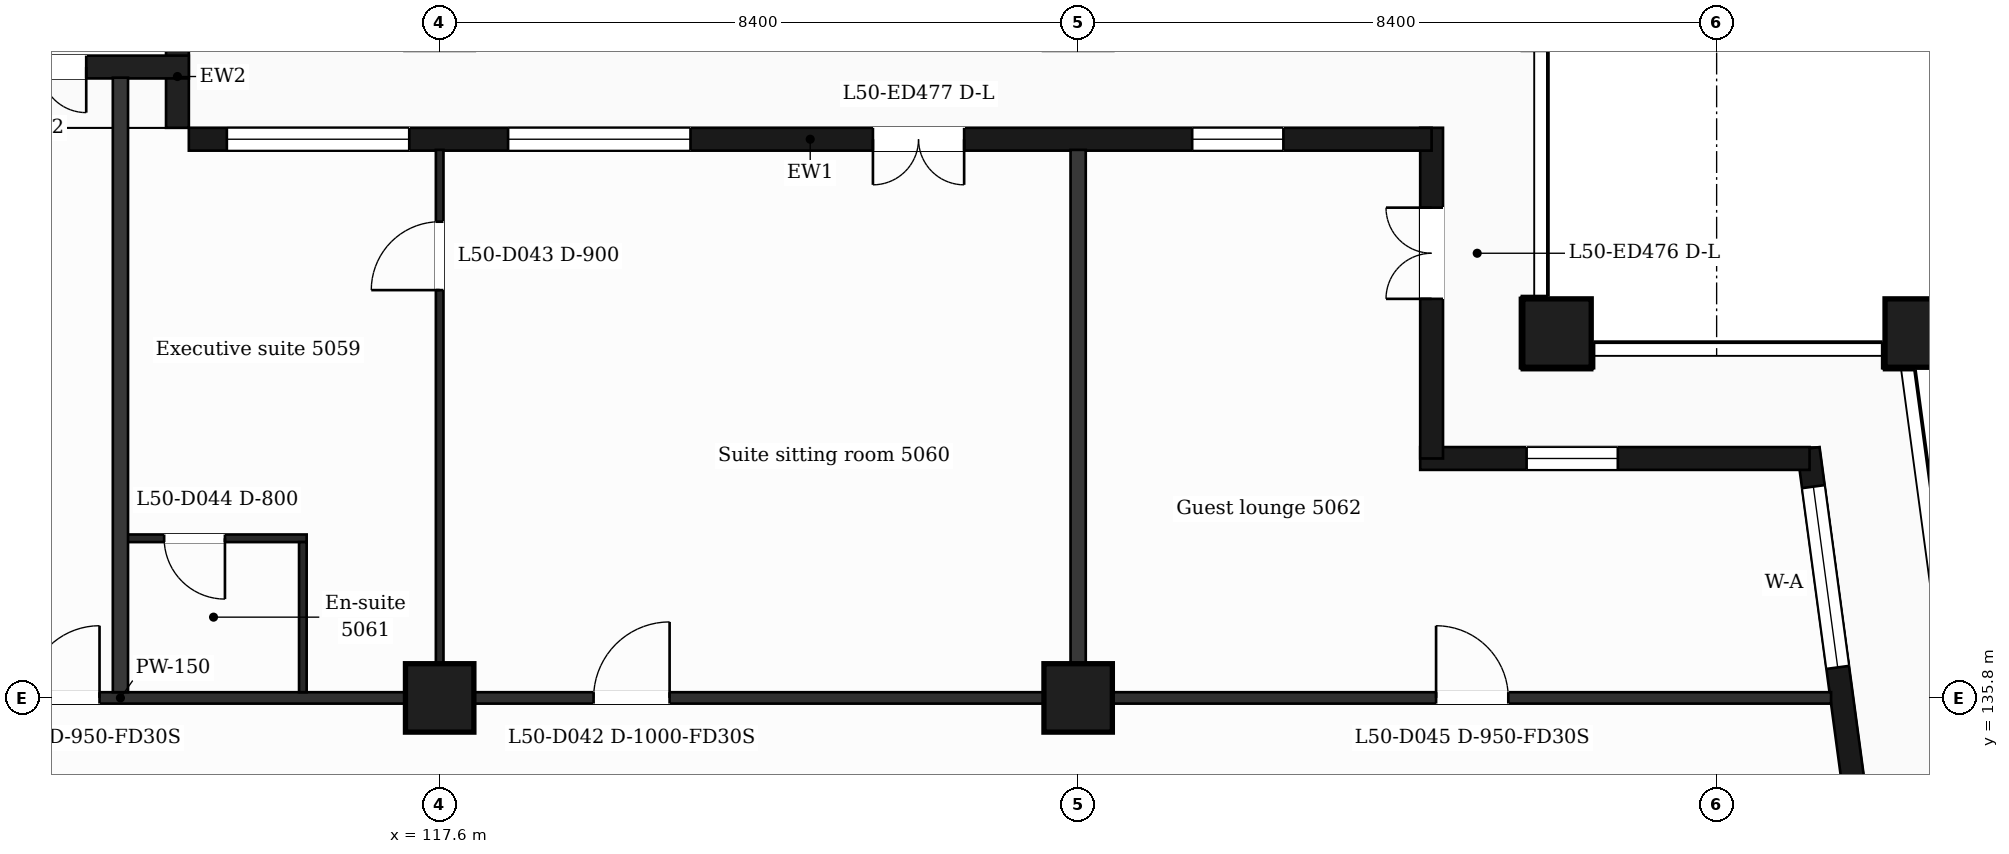
"""IFC4 building model, lengths in metres.
Left out: names, types, materials, properties, quantities, classifications, styles, units other than length and angle.
Written with IfcOpenShell. Run it as: python <this file> out.ifc"""

import sys

from ifc_helpers import new_model, si_unit, direction, frame, frame_2d, origin, origin_2d, place, context, subcontext, project, spatial, rectangle, extrude, element, fill, save


model = new_model("IFC4")
c1 = context("Model", 3, precision=1e-05, world=origin(), true_north=direction((0.0, 1.0)))
c2 = subcontext(c1, "Body", "Model", "MODEL_VIEW")
j1 = project(units=[si_unit("LENGTHUNIT", "METRE"), si_unit("PLANEANGLEUNIT", "RADIAN")], contexts=[c1])
p1 = place(None, origin())
s1 = spatial("IfcSite", under=j1, at=p1, CompositionType="ELEMENT")
p2 = place(p1, origin())
s2 = spatial("IfcBuilding", under=s1, at=p2, CompositionType="ELEMENT")
p3 = place(p2, frame((0.0, 0.0, 209.6)))
s3 = spatial("IfcBuildingStorey", under=s2, at=p3, CompositionType="ELEMENT", Elevation=209.6)
for number, where, z_axis, x_axis in (
    (1, (132.3, 140.6, 0.0), (0.0, 0.0, 1.0), (1.0, 0.0, 0.0)),
    (2, (137.065, 140.6, 0.0), (0.0, 0.0, 1.0), (1.0, 0.0, 0.0)),
    (3, (117.6, 135.8, 0.0), (0.0, 0.0, 1.0), (1.0, 0.0, 0.0)),
    (4, (126.0, 135.8, 0.0), (0.0, 0.0, 1.0), (1.0, 0.0, 0.0)),
):
    element("IfcColumn", number, at=place(p3, frame(where, z_axis=z_axis, x_axis=x_axis)), inside=s3, PredefinedType="COLUMN", context=c2, shape_type="SweptSolid", body=[
        extrude(rectangle(XDim=0.9, YDim=0.9, at=origin_2d()), origin(), (0.0, 0.0, 1.0), 3.7),
    ])
p4 = place(p3, frame((136.504, 132.4, 0.0), z_axis=(0.0, 0.0, 1.0), x_axis=(-0.133399697462, 0.99106231929, 0.0)))
e5 = element("IfcWall", 5, at=p4, inside=s3, PredefinedType="SOLIDWALL", context=c2, shape_type="SweptSolid", body=[
    extrude(rectangle(XDim=6.74, YDim=0.3, at=frame_2d((3.37, 0.0))), origin(), (0.0, 0.0, 1.0), 3.38),
])
p5 = place(p4, frame((1.115, 0.0, 0.0)))
e6 = element("IfcOpeningElement", 6, at=p5, cuts=e5, PredefinedType="OPENING", context=c2, shape_type="SweptSolid", body=[
    extrude(rectangle(XDim=1.2, YDim=2.4, at=frame_2d((0.6, 1.2))), frame((0.0, 0.16, 0.0), z_axis=(0.0, -1.0, 0.0), x_axis=(1.0, 0.0, 0.0)), (0.0, 0.0, 1.0), 0.32),
])
p6 = place(p4, frame((3.835, 0.0, 0.9)))
e7 = element("IfcOpeningElement", 7, at=p6, cuts=e5, PredefinedType="OPENING", context=c2, shape_type="SweptSolid", body=[
    extrude(rectangle(XDim=2.4, YDim=2.1, at=frame_2d((1.2, 1.05))), frame((0.0, 0.16, 0.0), z_axis=(0.0, -1.0, 0.0), x_axis=(1.0, 0.0, 0.0)), (0.0, 0.0, 1.0), 0.32),
])
p7 = place(p3, frame((135.623, 138.95, 0.0), z_axis=(0.0, 0.0, 1.0), x_axis=(-1.0, 0.0, 0.0)))
e8 = element("IfcWall", 8, at=p7, inside=s3, PredefinedType="SOLIDWALL", context=c2, shape_type="SweptSolid", body=[
    extrude(rectangle(XDim=5.123, YDim=0.3, at=frame_2d((2.561, 0.0))), origin(), (0.0, 0.0, 1.0), 3.38),
])
p8 = place(p7, frame((2.523, 0.0, 0.9)))
e9 = element("IfcOpeningElement", 9, at=p8, cuts=e8, PredefinedType="OPENING", context=c2, shape_type="SweptSolid", body=[
    extrude(rectangle(XDim=1.2, YDim=2.1, at=frame_2d((0.6, 1.05))), frame((0.0, 0.16, 0.0), z_axis=(0.0, -1.0, 0.0), x_axis=(1.0, 0.0, 0.0)), (0.0, 0.0, 1.0), 0.32),
])
p9 = place(p3, frame((130.65, 138.95, 0.0), z_axis=(0.0, 0.0, 1.0), x_axis=(0.0, 1.0, 0.0)))
e10 = element("IfcWall", 10, at=p9, inside=s3, PredefinedType="SOLIDWALL", context=c2, shape_type="SweptSolid", body=[
    extrude(rectangle(XDim=4.35, YDim=0.3, at=frame_2d((2.175, 0.0))), origin(), (0.0, 0.0, 1.0), 3.38),
])
p10 = place(p9, frame((2.1, 0.0, 0.0)))
e11 = element("IfcOpeningElement", 11, at=p10, cuts=e10, PredefinedType="OPENING", context=c2, shape_type="SweptSolid", body=[
    extrude(rectangle(XDim=1.2, YDim=2.4, at=frame_2d((0.6, 1.2))), frame((0.0, 0.16, 0.0), z_axis=(0.0, -1.0, 0.0), x_axis=(1.0, 0.0, 0.0)), (0.0, 0.0, 1.0), 0.32),
])
p11 = place(p3, frame((130.65, 143.15, 0.0), z_axis=(0.0, 0.0, 1.0), x_axis=(-1.0, 0.0, 0.0)))
e12 = element("IfcWall", 12, at=p11, inside=s3, PredefinedType="SOLIDWALL", context=c2, shape_type="SweptSolid", body=[
    extrude(rectangle(XDim=16.35, YDim=0.3, at=frame_2d((8.175, 0.0))), origin(), (0.0, 0.0, 1.0), 3.38),
])
p12 = place(p11, frame((1.95, 0.0, 0.9)))
e13 = element("IfcOpeningElement", 13, at=p12, cuts=e12, PredefinedType="OPENING", context=c2, shape_type="SweptSolid", body=[
    extrude(rectangle(XDim=1.2, YDim=2.1, at=frame_2d((0.6, 1.05))), frame((0.0, 0.16, 0.0), z_axis=(0.0, -1.0, 0.0), x_axis=(1.0, 0.0, 0.0)), (0.0, 0.0, 1.0), 0.32),
])
p13 = place(p11, frame((6.15, 0.0, 0.0)))
e14 = element("IfcOpeningElement", 14, at=p13, cuts=e12, PredefinedType="OPENING", context=c2, shape_type="SweptSolid", body=[
    extrude(rectangle(XDim=1.2, YDim=2.4, at=frame_2d((0.6, 1.2))), frame((0.0, 0.16, 0.0), z_axis=(0.0, -1.0, 0.0), x_axis=(1.0, 0.0, 0.0)), (0.0, 0.0, 1.0), 0.32),
])
p14 = place(p11, frame((9.75, 0.0, 0.9)))
e15 = element("IfcOpeningElement", 15, at=p14, cuts=e12, PredefinedType="OPENING", context=c2, shape_type="SweptSolid", body=[
    extrude(rectangle(XDim=2.4, YDim=2.1, at=frame_2d((1.2, 1.05))), frame((0.0, 0.16, 0.0), z_axis=(0.0, -1.0, 0.0), x_axis=(1.0, 0.0, 0.0)), (0.0, 0.0, 1.0), 0.32),
])
p15 = place(p11, frame((13.45, 0.0, 0.9)))
e16 = element("IfcOpeningElement", 16, at=p15, cuts=e12, PredefinedType="OPENING", context=c2, shape_type="SweptSolid", body=[
    extrude(rectangle(XDim=2.4, YDim=2.1, at=frame_2d((1.2, 1.05))), frame((0.0, 0.16, 0.0), z_axis=(0.0, -1.0, 0.0), x_axis=(1.0, 0.0, 0.0)), (0.0, 0.0, 1.0), 0.32),
])
p16 = place(p3, frame((114.15, 143.3, 0.0), z_axis=(0.0, 0.0, 1.0), x_axis=(0.0, 1.0, 0.0)))
e17 = element("IfcWall", 17, at=p16, inside=s3, PredefinedType="SOLIDWALL", context=c2, shape_type="SweptSolid", body=[
    extrude(rectangle(XDim=1.35, YDim=0.3, at=frame_2d((0.675, 0.0))), origin(), (0.0, 0.0, 1.0), 3.38),
])
p17 = place(p3, frame((114.3, 144.1, 0.0), z_axis=(0.0, 0.0, 1.0), x_axis=(-1.0, 0.0, 0.0)))
e18 = element("IfcWall", 18, at=p17, inside=s3, PredefinedType="SOLIDWALL", context=c2, shape_type="SweptSolid", body=[
    extrude(rectangle(XDim=3.9, YDim=0.3, at=frame_2d((1.95, 0.0))), origin(), (0.0, 0.0, 1.0), 3.38),
])
p18 = place(p17, frame((1.35, 0.0, 0.0)))
e19 = element("IfcOpeningElement", 19, at=p18, cuts=e18, PredefinedType="OPENING", context=c2, shape_type="SweptSolid", body=[
    extrude(rectangle(XDim=1.2, YDim=2.4, at=frame_2d((0.6, 1.2))), frame((0.0, 0.16, 0.0), z_axis=(0.0, -1.0, 0.0), x_axis=(1.0, 0.0, 0.0)), (0.0, 0.0, 1.0), 0.32),
])
p19 = place(p3, frame((90.895, 135.8, 0.0), z_axis=(0.0, 0.0, 1.0), x_axis=(1.0, 0.0, 0.0)))
e20 = element("IfcWall", 20, at=p19, inside=s3, PredefinedType="PARTITIONING", context=c2, shape_type="SweptSolid", body=[
    extrude(rectangle(XDim=45.011, YDim=0.15, at=frame_2d((22.505, 0.0))), origin(), (0.0, 0.0, 1.0), 3.38),
])
p20 = place(p19, frame((6.906, 0.0, 0.0)))
e21 = element("IfcOpeningElement", 21, at=p20, cuts=e20, PredefinedType="OPENING", context=c2, shape_type="SweptSolid", body=[
    extrude(rectangle(XDim=1.0, YDim=2.1, at=frame_2d((0.5, 1.05))), frame((0.0, 0.085, 0.0), z_axis=(0.0, -1.0, 0.0), x_axis=(1.0, 0.0, 0.0)), (0.0, 0.0, 1.0), 0.17),
])
p21 = place(p19, frame((11.531, 0.0, 0.0)))
e22 = element("IfcOpeningElement", 22, at=p21, cuts=e20, PredefinedType="OPENING", context=c2, shape_type="SweptSolid", body=[
    extrude(rectangle(XDim=0.95, YDim=2.1, at=frame_2d((0.475, 1.05))), frame((0.0, 0.085, 0.0), z_axis=(0.0, -1.0, 0.0), x_axis=(1.0, 0.0, 0.0)), (0.0, 0.0, 1.0), 0.17),
])
p22 = place(p19, frame((16.667, 0.0, 0.0)))
e23 = element("IfcOpeningElement", 23, at=p22, cuts=e20, PredefinedType="OPENING", context=c2, shape_type="SweptSolid", body=[
    extrude(rectangle(XDim=0.95, YDim=2.1, at=frame_2d((0.475, 1.05))), frame((0.0, 0.085, 0.0), z_axis=(0.0, -1.0, 0.0), x_axis=(1.0, 0.0, 0.0)), (0.0, 0.0, 1.0), 0.17),
])
p23 = place(p19, frame((21.281, 0.0, 0.0)))
e24 = element("IfcOpeningElement", 24, at=p23, cuts=e20, PredefinedType="OPENING", context=c2, shape_type="SweptSolid", body=[
    extrude(rectangle(XDim=0.95, YDim=2.1, at=frame_2d((0.475, 1.05))), frame((0.0, 0.085, 0.0), z_axis=(0.0, -1.0, 0.0), x_axis=(1.0, 0.0, 0.0)), (0.0, 0.0, 1.0), 0.17),
])
p24 = place(p19, frame((28.73, 0.0, 0.0)))
e25 = element("IfcOpeningElement", 25, at=p24, cuts=e20, PredefinedType="OPENING", context=c2, shape_type="SweptSolid", body=[
    extrude(rectangle(XDim=1.0, YDim=2.1, at=frame_2d((0.5, 1.05))), frame((0.0, 0.085, 0.0), z_axis=(0.0, -1.0, 0.0), x_axis=(1.0, 0.0, 0.0)), (0.0, 0.0, 1.0), 0.17),
])
p25 = place(p19, frame((39.814, 0.0, 0.0)))
e26 = element("IfcOpeningElement", 26, at=p25, cuts=e20, PredefinedType="OPENING", context=c2, shape_type="SweptSolid", body=[
    extrude(rectangle(XDim=0.95, YDim=2.1, at=frame_2d((0.475, 1.05))), frame((0.0, 0.085, 0.0), z_axis=(0.0, -1.0, 0.0), x_axis=(1.0, 0.0, 0.0)), (0.0, 0.0, 1.0), 0.17),
])
p26 = place(p3, frame((113.4, 137.9, 0.0), z_axis=(0.0, 0.0, 1.0), x_axis=(1.0, 0.0, 0.0)))
e27 = element("IfcWall", 27, at=p26, inside=s3, PredefinedType="PARTITIONING", context=c2, shape_type="SweptSolid", body=[
    extrude(rectangle(XDim=2.45, YDim=0.1, at=frame_2d((1.225, 0.0))), origin(), (0.0, 0.0, 1.0), 3.38),
])
p27 = place(p26, frame((0.575, 0.0, 0.0)))
e28 = element("IfcOpeningElement", 28, at=p27, cuts=e27, PredefinedType="OPENING", context=c2, shape_type="SweptSolid", body=[
    extrude(rectangle(XDim=0.8, YDim=2.1, at=frame_2d((0.4, 1.05))), frame((0.0, 0.06, 0.0), z_axis=(0.0, -1.0, 0.0), x_axis=(1.0, 0.0, 0.0)), (0.0, 0.0, 1.0), 0.12),
])
p28 = place(p3, frame((113.4, 135.875, 0.0), z_axis=(0.0, 0.0, 1.0), x_axis=(0.0, 1.0, 0.0)))
e29 = element("IfcWall", 29, at=p28, inside=s3, PredefinedType="PARTITIONING", context=c2, shape_type="SweptSolid", body=[
    extrude(rectangle(XDim=8.085, YDim=0.2, at=frame_2d((4.042, 0.0))), origin(), (0.0, 0.0, 1.0), 3.38),
])
p29 = place(p3, frame((115.8, 135.875, 0.0), z_axis=(0.0, 0.0, 1.0), x_axis=(0.0, 1.0, 0.0)))
e30 = element("IfcWall", 30, at=p29, inside=s3, PredefinedType="PARTITIONING", context=c2, shape_type="SweptSolid", body=[
    extrude(rectangle(XDim=1.975, YDim=0.1, at=frame_2d((0.988, 0.0))), origin(), (0.0, 0.0, 1.0), 3.38),
])
p30 = place(p3, frame((117.6, 135.875, 0.0), z_axis=(0.0, 0.0, 1.0), x_axis=(0.0, 1.0, 0.0)))
e31 = element("IfcWall", 31, at=p30, inside=s3, PredefinedType="PARTITIONING", context=c2, shape_type="SweptSolid", body=[
    extrude(rectangle(XDim=7.135, YDim=0.1, at=frame_2d((3.567, 0.0))), origin(), (0.0, 0.0, 1.0), 3.38),
])
p31 = place(p30, frame((5.29, 0.0, 0.0)))
e32 = element("IfcOpeningElement", 32, at=p31, cuts=e31, PredefinedType="OPENING", context=c2, shape_type="SweptSolid", body=[
    extrude(rectangle(XDim=0.9, YDim=2.1, at=frame_2d((0.45, 1.05))), frame((0.0, 0.06, 0.0), z_axis=(0.0, -1.0, 0.0), x_axis=(1.0, 0.0, 0.0)), (0.0, 0.0, 1.0), 0.12),
])
p32 = place(p3, frame((126.0, 135.875, 0.0), z_axis=(0.0, 0.0, 1.0), x_axis=(0.0, 1.0, 0.0)))
e33 = element("IfcWall", 33, at=p32, inside=s3, PredefinedType="PARTITIONING", context=c2, shape_type="SweptSolid", body=[
    extrude(rectangle(XDim=7.135, YDim=0.2, at=frame_2d((3.567, 0.0))), origin(), (0.0, 0.0, 1.0), 3.38),
])
p33 = place(p6, origin())
e34 = element("IfcWindow", 34, at=p33, inside=s3, PartitioningType="SINGLE_PANEL", PredefinedType="WINDOW", context=c2, shape_type="SweptSolid", body=[
    extrude(rectangle(XDim=2.4, YDim=2.1, at=frame_2d((1.2, 1.05))), frame((0.0, 0.03, 0.0), z_axis=(0.0, -1.0, 0.0), x_axis=(1.0, 0.0, 0.0)), (0.0, 0.0, 1.0), 0.06),
])
fill(e7, e34)
p34 = place(p8, origin())
e35 = element("IfcWindow", 35, at=p34, inside=s3, PartitioningType="SINGLE_PANEL", PredefinedType="WINDOW", context=c2, shape_type="SweptSolid", body=[
    extrude(rectangle(XDim=1.2, YDim=2.1, at=frame_2d((0.6, 1.05))), frame((0.0, 0.03, 0.0), z_axis=(0.0, -1.0, 0.0), x_axis=(1.0, 0.0, 0.0)), (0.0, 0.0, 1.0), 0.06),
])
fill(e9, e35)
p35 = place(p10, origin())
e36 = element("IfcDoor", 36, at=p35, inside=s3, OperationType="DOUBLE_DOOR_SINGLE_SWING", PredefinedType="DOOR", context=c2, shape_type="SweptSolid", body=[
    extrude(rectangle(XDim=1.2, YDim=2.4, at=frame_2d((0.6, 1.2))), frame((0.0, 0.025, 0.0), z_axis=(0.0, -1.0, 0.0), x_axis=(1.0, 0.0, 0.0)), (0.0, 0.0, 1.0), 0.05),
])
fill(e11, e36)
p36 = place(p12, origin())
e37 = element("IfcWindow", 37, at=p36, inside=s3, PartitioningType="SINGLE_PANEL", PredefinedType="WINDOW", context=c2, shape_type="SweptSolid", body=[
    extrude(rectangle(XDim=1.2, YDim=2.1, at=frame_2d((0.6, 1.05))), frame((0.0, 0.03, 0.0), z_axis=(0.0, -1.0, 0.0), x_axis=(1.0, 0.0, 0.0)), (0.0, 0.0, 1.0), 0.06),
])
fill(e13, e37)
p37 = place(p13, origin())
e38 = element("IfcDoor", 38, at=p37, inside=s3, OperationType="DOUBLE_DOOR_SINGLE_SWING", PredefinedType="DOOR", context=c2, shape_type="SweptSolid", body=[
    extrude(rectangle(XDim=1.2, YDim=2.4, at=frame_2d((0.6, 1.2))), frame((0.0, 0.025, 0.0), z_axis=(0.0, -1.0, 0.0), x_axis=(1.0, 0.0, 0.0)), (0.0, 0.0, 1.0), 0.05),
])
fill(e14, e38)
p38 = place(p14, origin())
e39 = element("IfcWindow", 39, at=p38, inside=s3, PartitioningType="SINGLE_PANEL", PredefinedType="WINDOW", context=c2, shape_type="SweptSolid", body=[
    extrude(rectangle(XDim=2.4, YDim=2.1, at=frame_2d((1.2, 1.05))), frame((0.0, 0.03, 0.0), z_axis=(0.0, -1.0, 0.0), x_axis=(1.0, 0.0, 0.0)), (0.0, 0.0, 1.0), 0.06),
])
fill(e15, e39)
p39 = place(p15, origin())
e40 = element("IfcWindow", 40, at=p39, inside=s3, PartitioningType="SINGLE_PANEL", PredefinedType="WINDOW", context=c2, shape_type="SweptSolid", body=[
    extrude(rectangle(XDim=2.4, YDim=2.1, at=frame_2d((1.2, 1.05))), frame((0.0, 0.03, 0.0), z_axis=(0.0, -1.0, 0.0), x_axis=(1.0, 0.0, 0.0)), (0.0, 0.0, 1.0), 0.06),
])
fill(e16, e40)
p40 = place(p18, origin())
e41 = element("IfcDoor", 41, at=p40, inside=s3, OperationType="DOUBLE_DOOR_SINGLE_SWING", PredefinedType="DOOR", context=c2, shape_type="SweptSolid", body=[
    extrude(rectangle(XDim=1.2, YDim=2.4, at=frame_2d((0.6, 1.2))), frame((0.0, 0.025, 0.0), z_axis=(0.0, -1.0, 0.0), x_axis=(1.0, 0.0, 0.0)), (0.0, 0.0, 1.0), 0.05),
])
fill(e19, e41)
p41 = place(p23, origin())
e42 = element("IfcDoor", 42, at=p41, inside=s3, OperationType="SINGLE_SWING_RIGHT", PredefinedType="DOOR", context=c2, shape_type="SweptSolid", body=[
    extrude(rectangle(XDim=0.95, YDim=2.1, at=frame_2d((0.475, 1.05))), frame((0.0, 0.025, 0.0), z_axis=(0.0, -1.0, 0.0), x_axis=(1.0, 0.0, 0.0)), (0.0, 0.0, 1.0), 0.05),
])
fill(e24, e42)
p42 = place(p24, origin())
e43 = element("IfcDoor", 43, at=p42, inside=s3, OperationType="SINGLE_SWING_RIGHT", PredefinedType="DOOR", context=c2, shape_type="SweptSolid", body=[
    extrude(rectangle(XDim=1.0, YDim=2.1, at=frame_2d((0.5, 1.05))), frame((0.0, 0.025, 0.0), z_axis=(0.0, -1.0, 0.0), x_axis=(1.0, 0.0, 0.0)), (0.0, 0.0, 1.0), 0.05),
])
fill(e25, e43)
p43 = place(p31, origin())
e44 = element("IfcDoor", 44, at=p43, inside=s3, OperationType="SINGLE_SWING_LEFT", PredefinedType="DOOR", context=c2, shape_type="SweptSolid", body=[
    extrude(rectangle(XDim=0.9, YDim=2.1, at=frame_2d((0.45, 1.05))), frame((0.0, 0.025, 0.0), z_axis=(0.0, -1.0, 0.0), x_axis=(1.0, 0.0, 0.0)), (0.0, 0.0, 1.0), 0.05),
])
fill(e32, e44)
p44 = place(p27, origin())
e45 = element("IfcDoor", 45, at=p44, inside=s3, OperationType="SINGLE_SWING_RIGHT", PredefinedType="DOOR", context=c2, shape_type="SweptSolid", body=[
    extrude(rectangle(XDim=0.8, YDim=2.1, at=frame_2d((0.4, 1.05))), frame((0.0, 0.025, 0.0), z_axis=(0.0, -1.0, 0.0), x_axis=(1.0, 0.0, 0.0)), (0.0, 0.0, 1.0), 0.05),
])
fill(e28, e45)
p45 = place(p25, origin())
e46 = element("IfcDoor", 46, at=p45, inside=s3, OperationType="SINGLE_SWING_LEFT", PredefinedType="DOOR", context=c2, shape_type="SweptSolid", body=[
    extrude(rectangle(XDim=0.95, YDim=2.1, at=frame_2d((0.475, 1.05))), frame((0.0, 0.025, 0.0), z_axis=(0.0, -1.0, 0.0), x_axis=(1.0, 0.0, 0.0)), (0.0, 0.0, 1.0), 0.05),
])
fill(e26, e46)
save(model, sys.argv[1])
